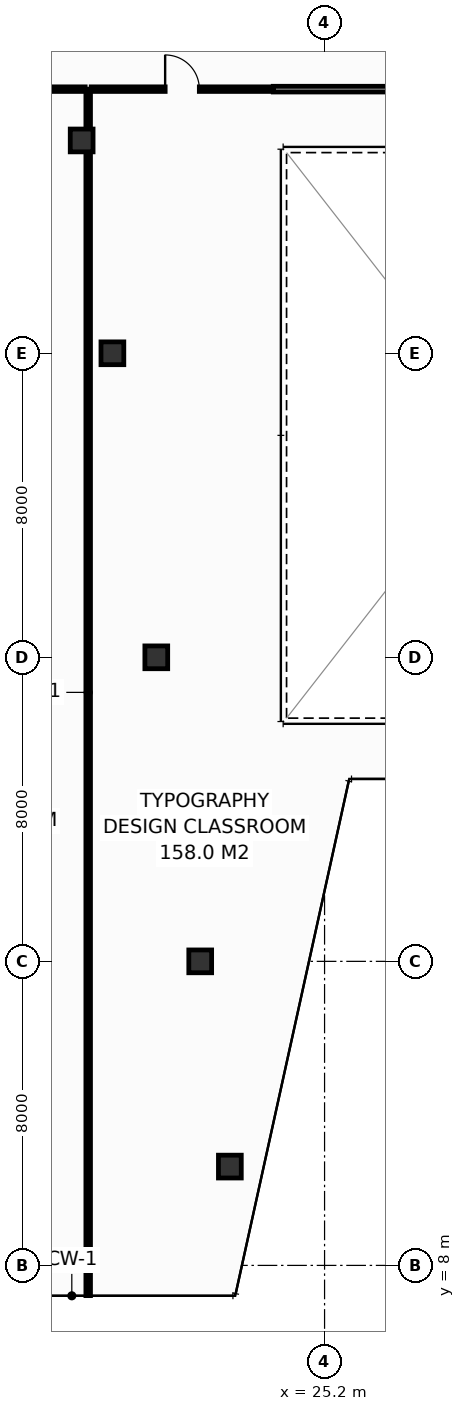
"""IFC4 building model, lengths in metres.
Left out: names, types, materials, properties, quantities, classifications, styles, units other than length and angle.
Written with IfcOpenShell. Run it as: python <this file> out.ifc"""

import sys

from ifc_helpers import new_model, si_unit, direction, frame, frame_2d, origin, origin_2d, place, context, subcontext, project, spatial, rectangle, hollow_rectangle, extrude, element, fill, save


model = new_model("IFC4")
c1 = context("Model", 3, precision=1e-05, world=origin(), true_north=direction((0.0, 1.0)))
c2 = subcontext(c1, "Body", "Model", "MODEL_VIEW")
j1 = project(units=[si_unit("LENGTHUNIT", "METRE"), si_unit("PLANEANGLEUNIT", "RADIAN")], contexts=[c1])
p1 = place(None, origin())
s1 = spatial("IfcSite", under=j1, at=p1, CompositionType="ELEMENT")
p2 = place(p1, origin())
s2 = spatial("IfcBuilding", under=s1, at=p2, CompositionType="ELEMENT")
p3 = place(p2, frame((0.0, 0.0, 133.4)))
s3 = spatial("IfcBuildingStorey", under=s2, at=p3, CompositionType="ELEMENT", Elevation=133.4)
for number, where, z_axis, x_axis in (
    (1, (22.708, 10.6, 0.0), (0.0, 0.0, 1.0), (1.0, 0.0, 0.0)),
    (2, (21.928, 16.0, 0.0), (0.0, 0.0, 1.0), (1.0, 0.0, 0.0)),
    (3, (20.772, 24.0, 0.0), (0.0, 0.0, 1.0), (1.0, 0.0, 0.0)),
    (4, (19.617, 32.0, 0.0), (0.0, 0.0, 1.0), (1.0, 0.0, 0.0)),
    (5, (18.808, 37.6, 0.0), (0.0, 0.0, 1.0), (1.0, 0.0, 0.0)),
):
    element("IfcColumn", number, at=place(p3, frame(where, z_axis=z_axis, x_axis=x_axis)), inside=s3, PredefinedType="COLUMN", context=c2, shape_type="SweptSolid", body=[
        extrude(hollow_rectangle(XDim=0.6, YDim=0.6, WallThickness=0.028, at=origin_2d()), origin(), (0.0, 0.0, 1.0), 3.8),
    ])
p4 = place(p3, frame((18.98, 7.205, 0.0), z_axis=(0.0, 0.0, 1.0), x_axis=(0.0, 1.0, 0.0)))
e6 = element("IfcWall", 6, at=p4, inside=s3, PredefinedType="PARTITIONING", context=c2, shape_type="SweptSolid", body=[
    extrude(rectangle(XDim=31.745, YDim=0.12, at=frame_2d((15.873, 0.0))), origin(), (0.0, 0.0, 1.0), 2.835),
])
p5 = place(p3, frame((13.33, 38.95, 0.0), z_axis=(0.0, 0.0, 1.0), x_axis=(1.0, 0.0, 0.0)))
e7 = element("IfcWall", 7, at=p5, inside=s3, PredefinedType="PARTITIONING", context=c2, shape_type="SweptSolid", body=[
    extrude(rectangle(XDim=5.57, YDim=0.12, at=frame_2d((2.785, 0.0))), origin(), (0.0, 0.0, 1.0), 3.55),
])
p6 = place(p5, frame((2.26, 0.0, 0.0)))
e8 = element("IfcOpeningElement", 8, at=p6, cuts=e7, PredefinedType="OPENING", context=c2, shape_type="SweptSolid", body=[
    extrude(rectangle(XDim=1.05, YDim=2.15, at=frame_2d((0.525, 1.075))), frame((0.0, 0.07, 0.0), z_axis=(0.0, -1.0, 0.0), x_axis=(1.0, 0.0, 0.0)), (0.0, 0.0, 1.0), 0.14),
])
p7 = place(p3, frame((19.06, 38.95, 0.0), z_axis=(0.0, 0.0, 1.0), x_axis=(1.0, 0.0, 0.0)))
e9 = element("IfcWall", 9, at=p7, inside=s3, PredefinedType="PARTITIONING", context=c2, shape_type="SweptSolid", body=[
    extrude(rectangle(XDim=4.79, YDim=0.12, at=frame_2d((2.395, 0.0))), origin(), (0.0, 0.0, 1.0), 2.835),
])
p8 = place(p7, frame((1.945, 0.0, 0.0)))
e10 = element("IfcOpeningElement", 10, at=p8, cuts=e9, PredefinedType="OPENING", context=c2, shape_type="SweptSolid", body=[
    extrude(rectangle(XDim=0.9, YDim=2.1, at=frame_2d((0.45, 1.05))), frame((0.0, 0.07, 0.0), z_axis=(0.0, -1.0, 0.0), x_axis=(1.0, 0.0, 0.0)), (0.0, 0.0, 1.0), 0.14),
])
p9 = place(p3, frame((23.85, 38.95, 0.0), z_axis=(0.0, 0.0, 1.0), x_axis=(1.0, 0.0, 0.0)))
e11 = element("IfcWall", 11, at=p9, inside=s3, PredefinedType="PARTITIONING", context=c2, shape_type="SweptSolid", body=[
    extrude(rectangle(XDim=12.3, YDim=0.15, at=frame_2d((6.15, 0.0))), origin(), (0.0, 0.0, 1.0), 3.55),
])
p10 = place(p8, origin())
e12 = element("IfcDoor", 12, at=p10, inside=s3, OperationType="SINGLE_SWING_LEFT", PredefinedType="DOOR", context=c2, shape_type="SweptSolid", body=[
    extrude(rectangle(XDim=0.9, YDim=2.1, at=frame_2d((0.45, 1.05))), frame((0.0, 0.025, 0.0), z_axis=(0.0, -1.0, 0.0), x_axis=(1.0, 0.0, 0.0)), (0.0, 0.0, 1.0), 0.05),
])
fill(e10, e12)
save(model, sys.argv[1])
